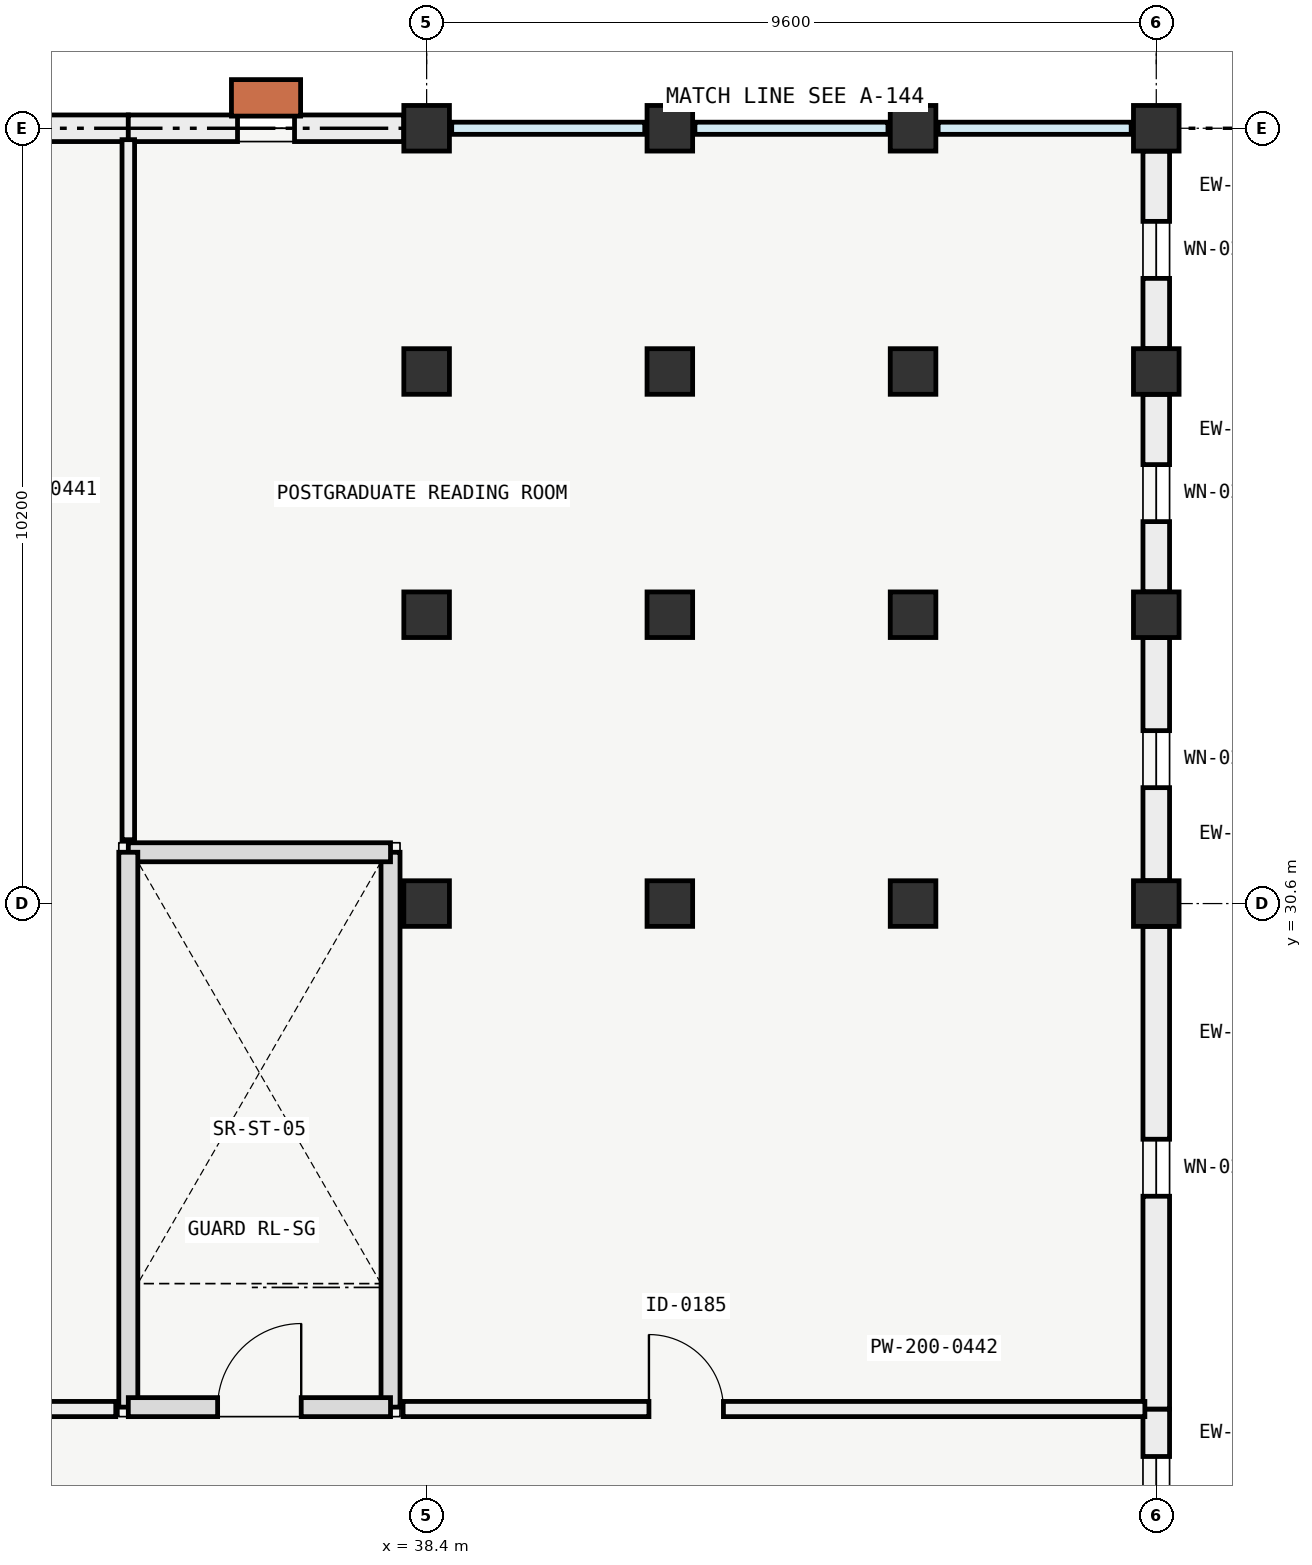
"""IFC4 building model, lengths in metres.
Left out: names, types, materials, properties, quantities, classifications, styles, units other than length and angle.
Written with IfcOpenShell. Run it as: python <this file> out.ifc"""

import sys

from ifc_helpers import new_model, si_unit, direction, frame, frame_2d, origin, origin_2d, place, context, subcontext, project, spatial, rectangle, extrude, element, fill, save


model = new_model("IFC4")
c1 = context("Model", 3, precision=1e-05, world=origin(), true_north=direction((0.0, 1.0)))
c2 = subcontext(c1, "Body", "Model", "MODEL_VIEW")
j1 = project(units=[si_unit("LENGTHUNIT", "METRE"), si_unit("PLANEANGLEUNIT", "RADIAN")], contexts=[c1])
p1 = place(None, origin())
s1 = spatial("IfcSite", under=j1, at=p1, CompositionType="ELEMENT")
p2 = place(p1, origin())
s2 = spatial("IfcBuilding", under=s1, at=p2, CompositionType="ELEMENT")
p3 = place(p2, frame((0.0, 0.0, 18.0)))
s3 = spatial("IfcBuildingStorey", under=s2, at=p3, CompositionType="ELEMENT", Elevation=18.0)
for number, where, z_axis, x_axis in (
    (1, (38.4, 30.6, 0.0), (0.0, 0.0, 1.0), (1.0, 0.0, 0.0)),
    (2, (38.4, 34.4, 0.0), (0.0, 0.0, 1.0), (1.0, 0.0, 0.0)),
    (3, (38.4, 37.6, 0.0), (0.0, 0.0, 1.0), (1.0, 0.0, 0.0)),
    (4, (38.4, 40.8, 0.0), (0.0, 0.0, 1.0), (1.0, 0.0, 0.0)),
    (5, (41.6, 30.6, 0.0), (0.0, 0.0, 1.0), (1.0, 0.0, 0.0)),
    (6, (41.6, 34.4, 0.0), (0.0, 0.0, 1.0), (1.0, 0.0, 0.0)),
    (7, (41.6, 37.6, 0.0), (0.0, 0.0, 1.0), (1.0, 0.0, 0.0)),
    (8, (41.6, 40.8, 0.0), (0.0, 0.0, 1.0), (1.0, 0.0, 0.0)),
    (9, (44.8, 30.6, 0.0), (0.0, 0.0, 1.0), (1.0, 0.0, 0.0)),
    (10, (44.8, 34.4, 0.0), (0.0, 0.0, 1.0), (1.0, 0.0, 0.0)),
    (11, (44.8, 37.6, 0.0), (0.0, 0.0, 1.0), (1.0, 0.0, 0.0)),
    (12, (44.8, 40.8, 0.0), (0.0, 0.0, 1.0), (1.0, 0.0, 0.0)),
    (13, (48.0, 30.6, 0.0), (0.0, 0.0, 1.0), (1.0, 0.0, 0.0)),
    (14, (48.0, 34.4, 0.0), (0.0, 0.0, 1.0), (1.0, 0.0, 0.0)),
    (15, (48.0, 37.6, 0.0), (0.0, 0.0, 1.0), (1.0, 0.0, 0.0)),
    (16, (48.0, 40.8, 0.0), (0.0, 0.0, 1.0), (1.0, 0.0, 0.0)),
):
    element("IfcColumn", number, at=place(p3, frame(where, z_axis=z_axis, x_axis=x_axis)), inside=s3, PredefinedType="COLUMN", context=c2, shape_type="SweptSolid", body=[
        extrude(rectangle(XDim=0.6, YDim=0.6, at=origin_2d()), origin(), (0.0, 0.0, 1.0), 4.2),
    ])
p4 = place(p3, frame((48.0, 23.95, 0.0), z_axis=(0.0, 0.0, 1.0), x_axis=(0.0, -1.0, 0.0)))
e17 = element("IfcWall", 17, at=p4, inside=s3, PredefinedType="SOLIDWALL", context=c2, shape_type="SweptSolid", body=[
    extrude(rectangle(XDim=3.249, YDim=0.35, at=frame_2d((1.625, 0.0))), origin(), (0.0, 0.0, 1.0), 2.33),
])
p5 = place(p4, frame((0.625, 0.0, 0.75)))
e18 = element("IfcOpeningElement", 18, at=p5, cuts=e17, PredefinedType="OPENING", context=c2, shape_type="SweptSolid", body=[
    extrude(rectangle(XDim=2.0, YDim=1.35, at=frame_2d((1.0, 0.675))), frame((0.0, 0.185, 0.0), z_axis=(0.0, -1.0, 0.0), x_axis=(1.0, 0.0, 0.0)), (0.0, 0.0, 1.0), 0.37),
])
p6 = place(p3, frame((48.0, 30.299, 0.0), z_axis=(0.0, 0.0, 1.0), x_axis=(0.0, -1.0, 0.0)))
e19 = element("IfcWall", 19, at=p6, inside=s3, PredefinedType="SOLIDWALL", context=c2, shape_type="SweptSolid", body=[
    extrude(rectangle(XDim=6.349, YDim=0.35, at=frame_2d((3.175, 0.0))), origin(), (0.0, 0.0, 1.0), 2.33),
])
p7 = place(p6, frame((2.8, 0.0, 0.85)))
e20 = element("IfcOpeningElement", 20, at=p7, cuts=e19, PredefinedType="OPENING", context=c2, shape_type="SweptSolid", body=[
    extrude(rectangle(XDim=0.75, YDim=1.1, at=frame_2d((0.375, 0.55))), frame((0.0, 0.185, 0.0), z_axis=(0.0, -1.0, 0.0), x_axis=(1.0, 0.0, 0.0)), (0.0, 0.0, 1.0), 0.37),
])
p8 = place(p3, frame((48.0, 40.499, 0.0), z_axis=(0.0, 0.0, 1.0), x_axis=(0.0, -1.0, 0.0)))
e21 = element("IfcWall", 21, at=p8, inside=s3, PredefinedType="SOLIDWALL", context=c2, shape_type="SweptSolid", body=[
    extrude(rectangle(XDim=2.598, YDim=0.35, at=frame_2d((1.299, 0.0))), origin(), (0.0, 0.0, 1.0), 2.33),
])
p9 = place(p8, frame((0.924, 0.0, 0.85)))
e22 = element("IfcOpeningElement", 22, at=p9, cuts=e21, PredefinedType="OPENING", context=c2, shape_type="SweptSolid", body=[
    extrude(rectangle(XDim=0.75, YDim=1.1, at=frame_2d((0.375, 0.55))), frame((0.0, 0.185, 0.0), z_axis=(0.0, -1.0, 0.0), x_axis=(1.0, 0.0, 0.0)), (0.0, 0.0, 1.0), 0.37),
])
p10 = place(p3, frame((48.0, 37.299, 0.0), z_axis=(0.0, 0.0, 1.0), x_axis=(0.0, -1.0, 0.0)))
e23 = element("IfcWall", 23, at=p10, inside=s3, PredefinedType="SOLIDWALL", context=c2, shape_type="SweptSolid", body=[
    extrude(rectangle(XDim=2.598, YDim=0.35, at=frame_2d((1.299, 0.0))), origin(), (0.0, 0.0, 1.0), 2.33),
])
p11 = place(p10, frame((0.924, 0.0, 0.85)))
e24 = element("IfcOpeningElement", 24, at=p11, cuts=e23, PredefinedType="OPENING", context=c2, shape_type="SweptSolid", body=[
    extrude(rectangle(XDim=0.75, YDim=1.1, at=frame_2d((0.375, 0.55))), frame((0.0, 0.185, 0.0), z_axis=(0.0, -1.0, 0.0), x_axis=(1.0, 0.0, 0.0)), (0.0, 0.0, 1.0), 0.37),
])
p12 = place(p3, frame((48.0, 34.099, 0.0), z_axis=(0.0, 0.0, 1.0), x_axis=(0.0, -1.0, 0.0)))
e25 = element("IfcWall", 25, at=p12, inside=s3, PredefinedType="SOLIDWALL", context=c2, shape_type="SweptSolid", body=[
    extrude(rectangle(XDim=3.198, YDim=0.35, at=frame_2d((1.599, 0.0))), origin(), (0.0, 0.0, 1.0), 2.33),
])
p13 = place(p12, frame((1.224, 0.0, 0.85)))
e26 = element("IfcOpeningElement", 26, at=p13, cuts=e25, PredefinedType="OPENING", context=c2, shape_type="SweptSolid", body=[
    extrude(rectangle(XDim=0.75, YDim=1.1, at=frame_2d((0.375, 0.55))), frame((0.0, 0.185, 0.0), z_axis=(0.0, -1.0, 0.0), x_axis=(1.0, 0.0, 0.0)), (0.0, 0.0, 1.0), 0.37),
])
p14 = place(p3, frame((29.101, 40.8, 0.0), z_axis=(0.0, 0.0, 1.0), x_axis=(1.0, 0.0, 0.0)))
e27 = element("IfcWall", 27, at=p14, inside=s3, PredefinedType="SOLIDWALL", context=c2, shape_type="SweptSolid", body=[
    extrude(rectangle(XDim=5.374, YDim=0.35, at=frame_2d((2.687, 0.0))), origin(), (0.0, 0.0, 1.0), 2.33),
])
p15 = place(p14, frame((2.312, 0.0, 0.85)))
e28 = element("IfcOpeningElement", 28, at=p15, cuts=e27, PredefinedType="OPENING", context=c2, shape_type="SweptSolid", body=[
    extrude(rectangle(XDim=0.75, YDim=1.1, at=frame_2d((0.375, 0.55))), frame((0.0, 0.185, 0.0), z_axis=(0.0, -1.0, 0.0), x_axis=(1.0, 0.0, 0.0)), (0.0, 0.0, 1.0), 0.37),
])
p16 = place(p3, frame((34.475, 40.8, 0.0), z_axis=(0.0, 0.0, 1.0), x_axis=(1.0, 0.0, 0.0)))
e29 = element("IfcWall", 29, at=p16, inside=s3, PredefinedType="SOLIDWALL", context=c2, shape_type="SweptSolid", body=[
    extrude(rectangle(XDim=3.624, YDim=0.35, at=frame_2d((1.812, 0.0))), origin(), (0.0, 0.0, 1.0), 2.33),
])
p17 = place(p16, frame((1.437, 0.0, 0.85)))
e30 = element("IfcOpeningElement", 30, at=p17, cuts=e29, PredefinedType="OPENING", context=c2, shape_type="SweptSolid", body=[
    extrude(rectangle(XDim=0.75, YDim=1.1, at=frame_2d((0.375, 0.55))), frame((0.0, 0.185, 0.0), z_axis=(0.0, -1.0, 0.0), x_axis=(1.0, 0.0, 0.0)), (0.0, 0.0, 1.0), 0.37),
])
p18 = place(p3, frame((37.925, 23.975, 0.0), z_axis=(0.0, 0.0, 1.0), x_axis=(0.0, 1.0, 0.0)))
e31 = element("IfcWall", 31, at=p18, inside=s3, PredefinedType="SOLIDWALL", context=c2, shape_type="SweptSolid", body=[
    extrude(rectangle(XDim=7.3, YDim=0.25, at=frame_2d((3.65, 0.0))), origin(), (0.0, 0.0, 1.0), 3.15),
])
p19 = place(p3, frame((37.925, 31.275, 0.0), z_axis=(0.0, 0.0, 1.0), x_axis=(-1.0, 0.0, 0.0)))
e32 = element("IfcWall", 32, at=p19, inside=s3, PredefinedType="SOLIDWALL", context=c2, shape_type="SweptSolid", body=[
    extrude(rectangle(XDim=3.45, YDim=0.25, at=frame_2d((1.725, 0.0))), origin(), (0.0, 0.0, 1.0), 3.15),
])
p20 = place(p3, frame((34.475, 31.275, 0.0), z_axis=(0.0, 0.0, 1.0), x_axis=(0.0, -1.0, 0.0)))
e33 = element("IfcWall", 33, at=p20, inside=s3, PredefinedType="SOLIDWALL", context=c2, shape_type="SweptSolid", body=[
    extrude(rectangle(XDim=7.3, YDim=0.25, at=frame_2d((3.65, 0.0))), origin(), (0.0, 0.0, 1.0), 3.15),
])
p21 = place(p3, frame((34.475, 23.975, 0.0), z_axis=(0.0, 0.0, 1.0), x_axis=(1.0, 0.0, 0.0)))
e34 = element("IfcWall", 34, at=p21, inside=s3, PredefinedType="SOLIDWALL", context=c2, shape_type="SweptSolid", body=[
    extrude(rectangle(XDim=3.45, YDim=0.25, at=frame_2d((1.725, 0.0))), origin(), (0.0, 0.0, 1.0), 3.15),
])
p22 = place(p21, frame((1.175, 0.0, 0.0)))
e35 = element("IfcOpeningElement", 35, at=p22, cuts=e34, PredefinedType="OPENING", context=c2, shape_type="SweptSolid", body=[
    extrude(rectangle(XDim=1.1, YDim=2.2, at=frame_2d((0.55, 1.1))), frame((0.0, 0.135, 0.0), z_axis=(0.0, -1.0, 0.0), x_axis=(1.0, 0.0, 0.0)), (0.0, 0.0, 1.0), 0.27),
])
p23 = place(p3, frame((27.325, 23.95, 0.0), z_axis=(0.0, 0.0, 1.0), x_axis=(1.0, 0.0, 0.0)))
e36 = element("IfcWall", 36, at=p23, inside=s3, PredefinedType="PARTITIONING", context=c2, shape_type="SweptSolid", body=[
    extrude(rectangle(XDim=6.985, YDim=0.2, at=frame_2d((3.493, 0.0))), origin(), (0.0, 0.0, 1.0), 3.28),
])
p24 = place(p23, frame((4.1, 0.0, 0.0)))
e37 = element("IfcOpeningElement", 37, at=p24, cuts=e36, PredefinedType="OPENING", context=c2, shape_type="SweptSolid", body=[
    extrude(rectangle(XDim=1.5, YDim=2.2, at=frame_2d((0.75, 1.1))), frame((0.0, 0.11, 0.0), z_axis=(0.0, -1.0, 0.0), x_axis=(1.0, 0.0, 0.0)), (0.0, 0.0, 1.0), 0.22),
])
p25 = place(p3, frame((34.475, 31.44, 0.0), z_axis=(0.0, 0.0, 1.0), x_axis=(0.0, 1.0, 0.0)))
e38 = element("IfcWall", 38, at=p25, inside=s3, PredefinedType="PARTITIONING", context=c2, shape_type="SweptSolid", body=[
    extrude(rectangle(XDim=9.21, YDim=0.165, at=frame_2d((4.605, 0.0))), origin(), (0.0, 0.0, 1.0), 3.28),
])
p26 = place(p3, frame((38.09, 23.95, 0.0), z_axis=(0.0, 0.0, 1.0), x_axis=(1.0, 0.0, 0.0)))
e39 = element("IfcWall", 39, at=p26, inside=s3, PredefinedType="PARTITIONING", context=c2, shape_type="SweptSolid", body=[
    extrude(rectangle(XDim=9.76, YDim=0.2, at=frame_2d((4.88, 0.0))), origin(), (0.0, 0.0, 1.0), 3.28),
])
p27 = place(p26, frame((3.235, 0.0, 0.0)))
e40 = element("IfcOpeningElement", 40, at=p27, cuts=e39, PredefinedType="OPENING", context=c2, shape_type="SweptSolid", body=[
    extrude(rectangle(XDim=0.98, YDim=2.15, at=frame_2d((0.49, 1.075))), frame((0.0, 0.11, 0.0), z_axis=(0.0, -1.0, 0.0), x_axis=(1.0, 0.0, 0.0)), (0.0, 0.0, 1.0), 0.22),
])
p28 = place(p5, origin())
e41 = element("IfcWindow", 41, at=p28, inside=s3, PartitioningType="SINGLE_PANEL", PredefinedType="WINDOW", context=c2, shape_type="SweptSolid", body=[
    extrude(rectangle(XDim=2.0, YDim=1.35, at=frame_2d((1.0, 0.675))), frame((0.0, 0.03, 0.0), z_axis=(0.0, -1.0, 0.0), x_axis=(1.0, 0.0, 0.0)), (0.0, 0.0, 1.0), 0.06),
])
fill(e18, e41)
p29 = place(p7, origin())
e42 = element("IfcWindow", 42, at=p29, inside=s3, PartitioningType="SINGLE_PANEL", PredefinedType="WINDOW", context=c2, shape_type="SweptSolid", body=[
    extrude(rectangle(XDim=0.75, YDim=1.1, at=frame_2d((0.375, 0.55))), frame((0.0, 0.03, 0.0), z_axis=(0.0, -1.0, 0.0), x_axis=(1.0, 0.0, 0.0)), (0.0, 0.0, 1.0), 0.06),
])
fill(e20, e42)
p30 = place(p9, origin())
e43 = element("IfcWindow", 43, at=p30, inside=s3, PartitioningType="SINGLE_PANEL", PredefinedType="WINDOW", context=c2, shape_type="SweptSolid", body=[
    extrude(rectangle(XDim=0.75, YDim=1.1, at=frame_2d((0.375, 0.55))), frame((0.0, 0.03, 0.0), z_axis=(0.0, -1.0, 0.0), x_axis=(1.0, 0.0, 0.0)), (0.0, 0.0, 1.0), 0.06),
])
fill(e22, e43)
p31 = place(p11, origin())
e44 = element("IfcWindow", 44, at=p31, inside=s3, PartitioningType="SINGLE_PANEL", PredefinedType="WINDOW", context=c2, shape_type="SweptSolid", body=[
    extrude(rectangle(XDim=0.75, YDim=1.1, at=frame_2d((0.375, 0.55))), frame((0.0, 0.03, 0.0), z_axis=(0.0, -1.0, 0.0), x_axis=(1.0, 0.0, 0.0)), (0.0, 0.0, 1.0), 0.06),
])
fill(e24, e44)
p32 = place(p13, origin())
e45 = element("IfcWindow", 45, at=p32, inside=s3, PartitioningType="SINGLE_PANEL", PredefinedType="WINDOW", context=c2, shape_type="SweptSolid", body=[
    extrude(rectangle(XDim=0.75, YDim=1.1, at=frame_2d((0.375, 0.55))), frame((0.0, 0.03, 0.0), z_axis=(0.0, -1.0, 0.0), x_axis=(1.0, 0.0, 0.0)), (0.0, 0.0, 1.0), 0.06),
])
fill(e26, e45)
p33 = place(p17, origin())
e46 = element("IfcWindow", 46, at=p33, inside=s3, PartitioningType="SINGLE_PANEL", PredefinedType="WINDOW", context=c2, shape_type="SweptSolid", body=[
    extrude(rectangle(XDim=0.75, YDim=1.1, at=frame_2d((0.375, 0.55))), frame((0.0, 0.03, 0.0), z_axis=(0.0, -1.0, 0.0), x_axis=(1.0, 0.0, 0.0)), (0.0, 0.0, 1.0), 0.06),
])
fill(e30, e46)
p34 = place(p22, origin())
e47 = element("IfcDoor", 47, at=p34, inside=s3, OperationType="SINGLE_SWING_RIGHT", PredefinedType="DOOR", context=c2, shape_type="SweptSolid", body=[
    extrude(rectangle(XDim=1.1, YDim=2.2, at=frame_2d((0.55, 1.1))), frame((0.0, 0.025, 0.0), z_axis=(0.0, -1.0, 0.0), x_axis=(1.0, 0.0, 0.0)), (0.0, 0.0, 1.0), 0.05),
])
fill(e35, e47)
p35 = place(p27, origin())
e48 = element("IfcDoor", 48, at=p35, inside=s3, OperationType="SINGLE_SWING_LEFT", PredefinedType="DOOR", context=c2, shape_type="SweptSolid", body=[
    extrude(rectangle(XDim=0.98, YDim=2.15, at=frame_2d((0.49, 1.075))), frame((0.0, 0.025, 0.0), z_axis=(0.0, -1.0, 0.0), x_axis=(1.0, 0.0, 0.0)), (0.0, 0.0, 1.0), 0.05),
])
fill(e40, e48)
save(model, sys.argv[1])
